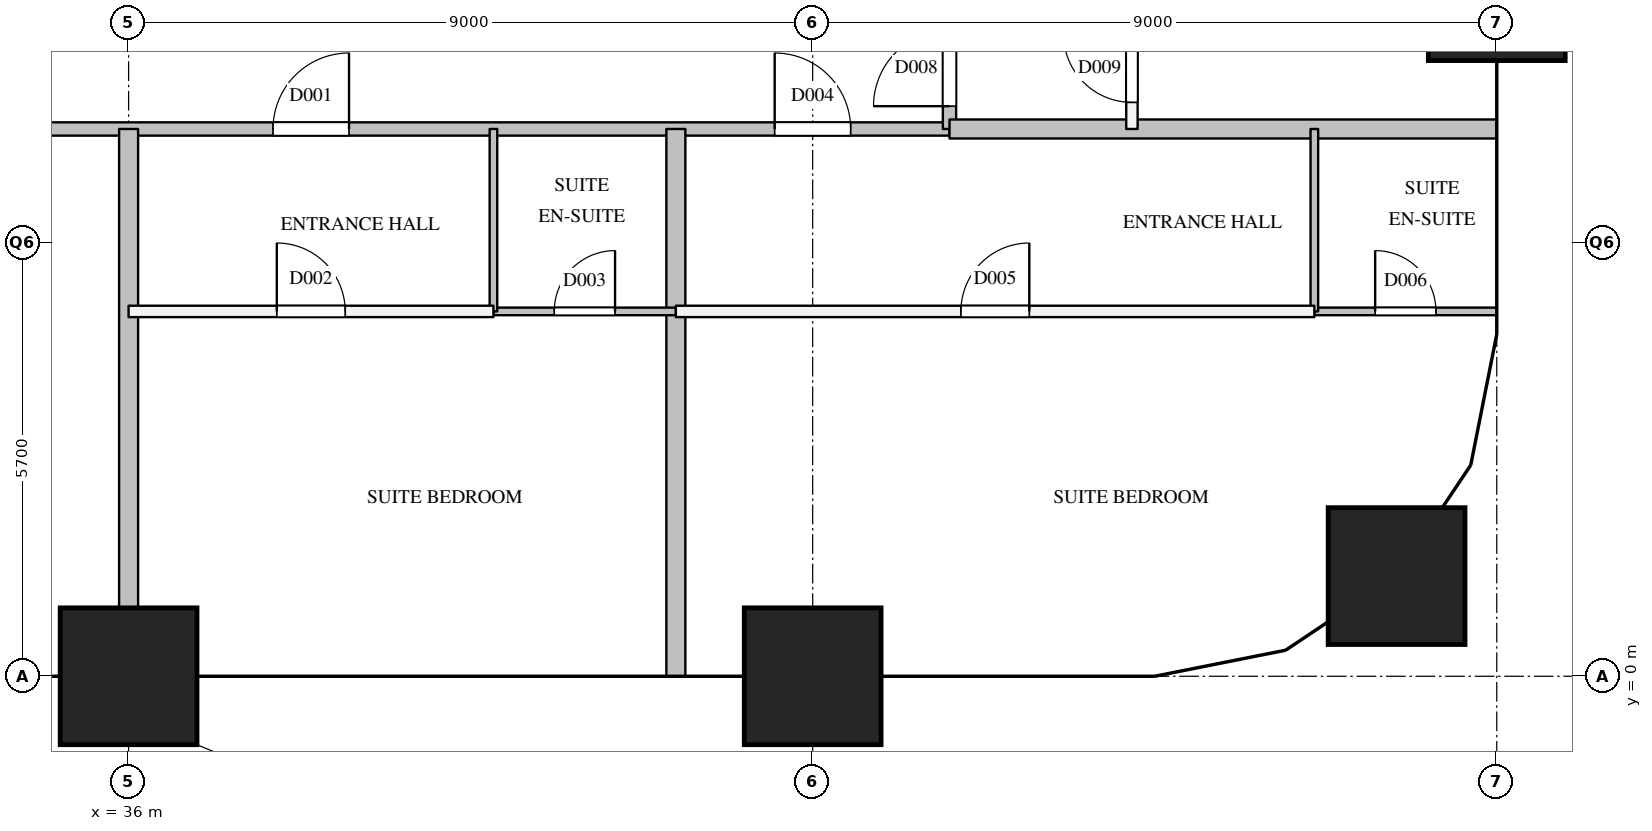
"""IFC4 building model, lengths in metres.
Left out: names, types, materials, properties, quantities, classifications, styles, units other than length and angle.
Written with IfcOpenShell. Run it as: python <this file> out.ifc"""

import sys

from ifc_helpers import new_model, si_unit, direction, frame, frame_2d, origin, origin_2d, place, context, subcontext, project, spatial, rectangle, extrude, element, fill, save


model = new_model("IFC4")
c1 = context("Model", 3, precision=1e-05, world=origin(), true_north=direction((0.0, 1.0)))
c2 = subcontext(c1, "Body", "Model", "MODEL_VIEW")
j1 = project(units=[si_unit("LENGTHUNIT", "METRE"), si_unit("PLANEANGLEUNIT", "RADIAN")], contexts=[c1])
p1 = place(None, origin())
s1 = spatial("IfcSite", under=j1, at=p1, CompositionType="ELEMENT")
p2 = place(p1, origin())
s2 = spatial("IfcBuilding", under=s1, at=p2, CompositionType="ELEMENT")
p3 = place(p2, frame((0.0, 0.0, 112.0)))
s3 = spatial("IfcBuildingStorey", under=s2, at=p3, CompositionType="ELEMENT", Elevation=112.0)
for number, where, z_axis, x_axis in (
    (1, (36.0, 0.0, 0.0), (0.0, 0.0, 1.0), (1.0, 0.0, 0.0)),
    (2, (45.0, 0.0, 0.0), (0.0, 0.0, 1.0), (1.0, 0.0, 0.0)),
    (3, (52.682, 1.318, 0.0), (0.0, 0.0, 1.0), (1.0, 0.0, 0.0)),
    (4, (54.0, 9.0, 0.0), (0.0, 0.0, 1.0), (1.0, 0.0, 0.0)),
):
    element("IfcColumn", number, at=place(p3, frame(where, z_axis=z_axis, x_axis=x_axis)), inside=s3, PredefinedType="COLUMN", context=c2, shape_type="SweptSolid", body=[
        extrude(rectangle(XDim=1.8, YDim=1.8, at=origin_2d()), origin(), (0.0, 0.0, 1.0), 3.8),
    ])
p4 = place(p3, frame((34.2, 7.2, 0.0), z_axis=(0.0, 0.0, 1.0), x_axis=(1.0, 0.0, 0.0)))
e5 = element("IfcWall", 5, at=p4, inside=s3, PredefinedType="PARTITIONING", context=c2, shape_type="SweptSolid", body=[
    extrude(rectangle(XDim=12.6, YDim=0.175, at=frame_2d((6.3, 0.0))), origin(), (0.0, 0.0, 1.0), 3.5),
])
p5 = place(p4, frame((3.7, 0.0, 0.0)))
e6 = element("IfcOpeningElement", 6, at=p5, cuts=e5, PredefinedType="OPENING", context=c2, shape_type="SweptSolid", body=[
    extrude(rectangle(XDim=1.0, YDim=2.1, at=frame_2d((0.5, 1.05))), frame((0.0, 0.097, 0.0), z_axis=(0.0, -1.0, 0.0), x_axis=(1.0, 0.0, 0.0)), (0.0, 0.0, 1.0), 0.195),
])
p6 = place(p4, frame((10.3, 0.0, 0.0)))
e7 = element("IfcOpeningElement", 7, at=p6, cuts=e5, PredefinedType="OPENING", context=c2, shape_type="SweptSolid", body=[
    extrude(rectangle(XDim=1.0, YDim=2.1, at=frame_2d((0.5, 1.05))), frame((0.0, 0.097, 0.0), z_axis=(0.0, -1.0, 0.0), x_axis=(1.0, 0.0, 0.0)), (0.0, 0.0, 1.0), 0.195),
])
p7 = place(p3, frame((46.8, 7.2, 0.0), z_axis=(0.0, 0.0, 1.0), x_axis=(0.0, 1.0, 0.0)))
e8 = element("IfcWall", 8, at=p7, inside=s3, PredefinedType="PARTITIONING", context=c2, shape_type="SweptSolid", body=[
    extrude(rectangle(XDim=16.49, YDim=0.175, at=frame_2d((8.245, 0.0))), origin(), (0.0, 0.0, 1.0), 3.5),
])
p8 = place(p7, frame((0.3, 0.0, 0.0)))
e9 = element("IfcOpeningElement", 9, at=p8, cuts=e8, PredefinedType="OPENING", context=c2, shape_type="SweptSolid", body=[
    extrude(rectangle(XDim=1.0, YDim=2.1, at=frame_2d((0.5, 1.05))), frame((0.0, 0.097, 0.0), z_axis=(0.0, -1.0, 0.0), x_axis=(1.0, 0.0, 0.0)), (0.0, 0.0, 1.0), 0.195),
])
p9 = place(p7, frame((5.5, 0.0, 0.0)))
e10 = element("IfcOpeningElement", 10, at=p9, cuts=e8, PredefinedType="OPENING", context=c2, shape_type="SweptSolid", body=[
    extrude(rectangle(XDim=1.0, YDim=2.1, at=frame_2d((0.5, 1.05))), frame((0.0, 0.097, 0.0), z_axis=(0.0, -1.0, 0.0), x_axis=(1.0, 0.0, 0.0)), (0.0, 0.0, 1.0), 0.195),
])
p10 = place(p7, frame((11.1, 0.0, 0.0)))
e11 = element("IfcOpeningElement", 11, at=p10, cuts=e8, PredefinedType="OPENING", context=c2, shape_type="SweptSolid", body=[
    extrude(rectangle(XDim=1.0, YDim=2.1, at=frame_2d((0.5, 1.05))), frame((0.0, 0.097, 0.0), z_axis=(0.0, -1.0, 0.0), x_axis=(1.0, 0.0, 0.0)), (0.0, 0.0, 1.0), 0.195),
])
p11 = place(p3, frame((36.0, 4.8, 0.0), z_axis=(0.0, 0.0, 1.0), x_axis=(1.0, 0.0, 0.0)))
e12 = element("IfcWall", 12, at=p11, inside=s3, PredefinedType="PARTITIONING", context=c2, shape_type="SweptSolid", body=[
    extrude(rectangle(XDim=4.8, YDim=0.15, at=frame_2d((2.4, 0.0))), origin(), (0.0, 0.0, 1.0), 3.5),
])
p12 = place(p11, frame((1.95, 0.0, 0.0)))
e13 = element("IfcOpeningElement", 13, at=p12, cuts=e12, PredefinedType="OPENING", context=c2, shape_type="SweptSolid", body=[
    extrude(rectangle(XDim=0.9, YDim=2.1, at=frame_2d((0.45, 1.05))), frame((0.0, 0.085, 0.0), z_axis=(0.0, -1.0, 0.0), x_axis=(1.0, 0.0, 0.0)), (0.0, 0.0, 1.0), 0.17),
])
p13 = place(p3, frame((43.2, 4.8, 0.0), z_axis=(0.0, 0.0, 1.0), x_axis=(1.0, 0.0, 0.0)))
e14 = element("IfcWall", 14, at=p13, inside=s3, PredefinedType="PARTITIONING", context=c2, shape_type="SweptSolid", body=[
    extrude(rectangle(XDim=8.4, YDim=0.15, at=frame_2d((4.2, 0.0))), origin(), (0.0, 0.0, 1.0), 3.5),
])
p14 = place(p13, frame((3.75, 0.0, 0.0)))
e15 = element("IfcOpeningElement", 15, at=p14, cuts=e14, PredefinedType="OPENING", context=c2, shape_type="SweptSolid", body=[
    extrude(rectangle(XDim=0.9, YDim=2.1, at=frame_2d((0.45, 1.05))), frame((0.0, 0.085, 0.0), z_axis=(0.0, -1.0, 0.0), x_axis=(1.0, 0.0, 0.0)), (0.0, 0.0, 1.0), 0.17),
])
p15 = place(p3, frame((49.2, 7.2, 0.0), z_axis=(0.0, 0.0, 1.0), x_axis=(0.0, 1.0, 0.0)))
e16 = element("IfcWall", 16, at=p15, inside=s3, PredefinedType="PARTITIONING", context=c2, shape_type="SweptSolid", body=[
    extrude(rectangle(XDim=1.6, YDim=0.15, at=frame_2d((0.8, 0.0))), origin(), (0.0, 0.0, 1.0), 3.5),
])
p16 = place(p15, frame((0.35, 0.0, 0.0)))
e17 = element("IfcOpeningElement", 17, at=p16, cuts=e16, PredefinedType="OPENING", context=c2, shape_type="SweptSolid", body=[
    extrude(rectangle(XDim=0.9, YDim=2.1, at=frame_2d((0.45, 1.05))), frame((0.0, 0.085, 0.0), z_axis=(0.0, -1.0, 0.0), x_axis=(1.0, 0.0, 0.0)), (0.0, 0.0, 1.0), 0.17),
])
p17 = place(p3, frame((46.8, 7.2, 0.0), z_axis=(0.0, 0.0, 1.0), x_axis=(1.0, 0.0, 0.0)))
e18 = element("IfcWall", 18, at=p17, inside=s3, PredefinedType="PARTITIONING", context=c2, shape_type="SweptSolid", body=[
    extrude(rectangle(XDim=7.2, YDim=0.25, at=frame_2d((3.6, 0.0))), origin(), (0.0, 0.0, 1.0), 2.5),
])
p18 = place(p3, frame((36.0, 0.0, 0.0), z_axis=(0.0, 0.0, 1.0), x_axis=(0.0, 1.0, 0.0)))
e19 = element("IfcWall", 19, at=p18, inside=s3, PredefinedType="PARTITIONING", context=c2, shape_type="SweptSolid", body=[
    extrude(rectangle(XDim=7.2, YDim=0.25, at=frame_2d((3.6, 0.0))), origin(), (0.0, 0.0, 1.0), 3.5),
])
p19 = place(p3, frame((43.2, 0.0, 0.0), z_axis=(0.0, 0.0, 1.0), x_axis=(0.0, 1.0, 0.0)))
e20 = element("IfcWall", 20, at=p19, inside=s3, PredefinedType="PARTITIONING", context=c2, shape_type="SweptSolid", body=[
    extrude(rectangle(XDim=7.2, YDim=0.25, at=frame_2d((3.6, 0.0))), origin(), (0.0, 0.0, 1.0), 2.5),
])
p20 = place(p3, frame((40.8, 4.8, 0.0), z_axis=(0.0, 0.0, 1.0), x_axis=(1.0, 0.0, 0.0)))
e21 = element("IfcWall", 21, at=p20, inside=s3, PredefinedType="PARTITIONING", context=c2, shape_type="SweptSolid", body=[
    extrude(rectangle(XDim=2.4, YDim=0.1, at=frame_2d((1.2, 0.0))), origin(), (0.0, 0.0, 1.0), 3.5),
])
p21 = place(p20, frame((0.8, 0.0, 0.0)))
e22 = element("IfcOpeningElement", 22, at=p21, cuts=e21, PredefinedType="OPENING", context=c2, shape_type="SweptSolid", body=[
    extrude(rectangle(XDim=0.8, YDim=2.1, at=frame_2d((0.4, 1.05))), frame((0.0, 0.06, 0.0), z_axis=(0.0, -1.0, 0.0), x_axis=(1.0, 0.0, 0.0)), (0.0, 0.0, 1.0), 0.12),
])
p22 = place(p3, frame((51.6, 4.8, 0.0), z_axis=(0.0, 0.0, 1.0), x_axis=(1.0, 0.0, 0.0)))
e23 = element("IfcWall", 23, at=p22, inside=s3, PredefinedType="PARTITIONING", context=c2, shape_type="SweptSolid", body=[
    extrude(rectangle(XDim=2.4, YDim=0.1, at=frame_2d((1.2, 0.0))), origin(), (0.0, 0.0, 1.0), 2.5),
])
p23 = place(p22, frame((0.8, 0.0, 0.0)))
e24 = element("IfcOpeningElement", 24, at=p23, cuts=e23, PredefinedType="OPENING", context=c2, shape_type="SweptSolid", body=[
    extrude(rectangle(XDim=0.8, YDim=2.1, at=frame_2d((0.4, 1.05))), frame((0.0, 0.06, 0.0), z_axis=(0.0, -1.0, 0.0), x_axis=(1.0, 0.0, 0.0)), (0.0, 0.0, 1.0), 0.12),
])
for number, where, z_axis, x_axis in (
    (25, (40.8, 4.8, 0.0), (0.0, 0.0, 1.0), (0.0, 1.0, 0.0)),
    (26, (51.6, 4.8, 0.0), (0.0, 0.0, 1.0), (0.0, 1.0, 0.0)),
):
    element("IfcWall", number, at=place(p3, frame(where, z_axis=z_axis, x_axis=x_axis)), inside=s3, PredefinedType="PARTITIONING", context=c2, shape_type="SweptSolid", body=[
        extrude(rectangle(XDim=2.4, YDim=0.1, at=frame_2d((1.2, 0.0))), origin(), (0.0, 0.0, 1.0), 3.5),
    ])
p24 = place(p5, origin())
e27 = element("IfcDoor", 27, at=p24, inside=s3, OperationType="SINGLE_SWING_RIGHT", PredefinedType="DOOR", context=c2, shape_type="SweptSolid", body=[
    extrude(rectangle(XDim=1.0, YDim=2.1, at=frame_2d((0.5, 1.05))), frame((0.0, 0.025, 0.0), z_axis=(0.0, -1.0, 0.0), x_axis=(1.0, 0.0, 0.0)), (0.0, 0.0, 1.0), 0.05),
])
fill(e6, e27)
p25 = place(p12, origin())
e28 = element("IfcDoor", 28, at=p25, inside=s3, OperationType="SINGLE_SWING_LEFT", PredefinedType="DOOR", context=c2, shape_type="SweptSolid", body=[
    extrude(rectangle(XDim=0.9, YDim=2.1, at=frame_2d((0.45, 1.05))), frame((0.0, 0.025, 0.0), z_axis=(0.0, -1.0, 0.0), x_axis=(1.0, 0.0, 0.0)), (0.0, 0.0, 1.0), 0.05),
])
fill(e13, e28)
p26 = place(p21, origin())
e29 = element("IfcDoor", 29, at=p26, inside=s3, OperationType="SINGLE_SWING_RIGHT", PredefinedType="DOOR", context=c2, shape_type="SweptSolid", body=[
    extrude(rectangle(XDim=0.8, YDim=2.1, at=frame_2d((0.4, 1.05))), frame((0.0, 0.025, 0.0), z_axis=(0.0, -1.0, 0.0), x_axis=(1.0, 0.0, 0.0)), (0.0, 0.0, 1.0), 0.05),
])
fill(e22, e29)
p27 = place(p6, origin())
e30 = element("IfcDoor", 30, at=p27, inside=s3, OperationType="SINGLE_SWING_LEFT", PredefinedType="DOOR", context=c2, shape_type="SweptSolid", body=[
    extrude(rectangle(XDim=1.0, YDim=2.1, at=frame_2d((0.5, 1.05))), frame((0.0, 0.025, 0.0), z_axis=(0.0, -1.0, 0.0), x_axis=(1.0, 0.0, 0.0)), (0.0, 0.0, 1.0), 0.05),
])
fill(e7, e30)
p28 = place(p14, origin())
e31 = element("IfcDoor", 31, at=p28, inside=s3, OperationType="SINGLE_SWING_RIGHT", PredefinedType="DOOR", context=c2, shape_type="SweptSolid", body=[
    extrude(rectangle(XDim=0.9, YDim=2.1, at=frame_2d((0.45, 1.05))), frame((0.0, 0.025, 0.0), z_axis=(0.0, -1.0, 0.0), x_axis=(1.0, 0.0, 0.0)), (0.0, 0.0, 1.0), 0.05),
])
fill(e15, e31)
p29 = place(p23, origin())
e32 = element("IfcDoor", 32, at=p29, inside=s3, OperationType="SINGLE_SWING_LEFT", PredefinedType="DOOR", context=c2, shape_type="SweptSolid", body=[
    extrude(rectangle(XDim=0.8, YDim=2.1, at=frame_2d((0.4, 1.05))), frame((0.0, 0.025, 0.0), z_axis=(0.0, -1.0, 0.0), x_axis=(1.0, 0.0, 0.0)), (0.0, 0.0, 1.0), 0.05),
])
fill(e24, e32)
p30 = place(p8, origin())
e33 = element("IfcDoor", 33, at=p30, inside=s3, OperationType="SINGLE_SWING_LEFT", PredefinedType="DOOR", context=c2, shape_type="SweptSolid", body=[
    extrude(rectangle(XDim=1.0, YDim=2.1, at=frame_2d((0.5, 1.05))), frame((0.0, 0.025, 0.0), z_axis=(0.0, -1.0, 0.0), x_axis=(1.0, 0.0, 0.0)), (0.0, 0.0, 1.0), 0.05),
])
fill(e9, e33)
p31 = place(p16, origin())
e34 = element("IfcDoor", 34, at=p31, inside=s3, OperationType="SINGLE_SWING_RIGHT", PredefinedType="DOOR", context=c2, shape_type="SweptSolid", body=[
    extrude(rectangle(XDim=0.9, YDim=2.1, at=frame_2d((0.45, 1.05))), frame((0.0, 0.025, 0.0), z_axis=(0.0, -1.0, 0.0), x_axis=(1.0, 0.0, 0.0)), (0.0, 0.0, 1.0), 0.05),
])
fill(e17, e34)
save(model, sys.argv[1])
